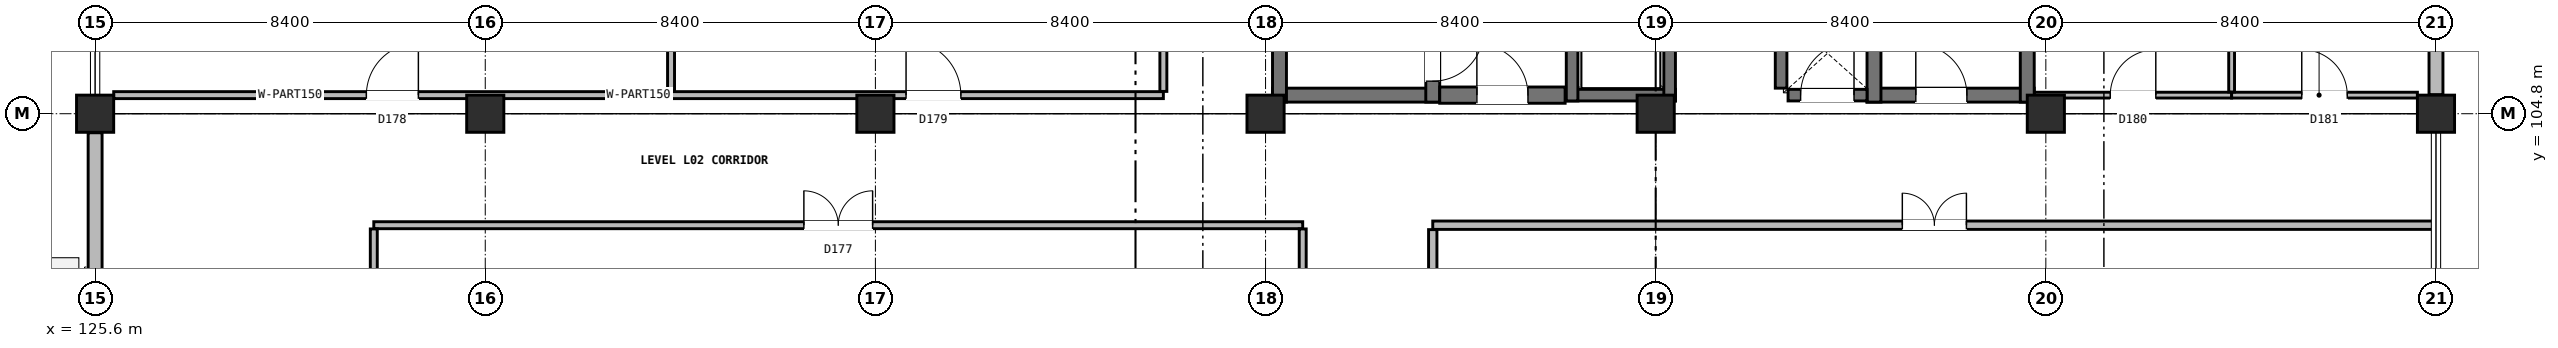
"""IFC4 building model, lengths in metres.
Left out: names, types, materials, properties, quantities, classifications, styles, units other than length and angle.
Written with IfcOpenShell. Run it as: python <this file> out.ifc"""

import sys

from ifc_helpers import new_model, si_unit, direction, frame, frame_2d, origin, origin_2d, place, context, subcontext, project, spatial, rectangle, extrude, element, fill, save


model = new_model("IFC4")
c1 = context("Model", 3, precision=1e-05, world=origin(), true_north=direction((0.0, 1.0)))
c2 = subcontext(c1, "Body", "Model", "MODEL_VIEW")
j1 = project(units=[si_unit("LENGTHUNIT", "METRE"), si_unit("PLANEANGLEUNIT", "RADIAN")], contexts=[c1])
p1 = place(None, origin())
s1 = spatial("IfcSite", under=j1, at=p1, CompositionType="ELEMENT")
p2 = place(p1, origin())
s2 = spatial("IfcBuilding", under=s1, at=p2, CompositionType="ELEMENT")
p3 = place(p2, frame((0.0, 0.0, 9.0)))
s3 = spatial("IfcBuildingStorey", under=s2, at=p3, CompositionType="ELEMENT", Elevation=9.0)
for number, where, z_axis, x_axis in (
    (1, (125.6, 104.8, 0.0), (0.0, 0.0, 1.0), (1.0, 0.0, 0.0)),
    (2, (134.0, 104.8, 0.0), (0.0, 0.0, 1.0), (1.0, 0.0, 0.0)),
    (3, (142.4, 104.8, 0.0), (0.0, 0.0, 1.0), (1.0, 0.0, 0.0)),
    (4, (150.8, 104.8, 0.0), (0.0, 0.0, 1.0), (1.0, 0.0, 0.0)),
    (5, (159.2, 104.8, 0.0), (0.0, 0.0, 1.0), (1.0, 0.0, 0.0)),
    (6, (167.6, 104.8, 0.0), (0.0, 0.0, 1.0), (1.0, 0.0, 0.0)),
    (7, (176.0, 104.8, 0.0), (0.0, 0.0, 1.0), (1.0, 0.0, 0.0)),
):
    element("IfcColumn", number, at=place(p3, frame(where, z_axis=z_axis, x_axis=x_axis)), inside=s3, PredefinedType="COLUMN", context=c2, shape_type="SweptSolid", body=[
        extrude(rectangle(XDim=0.8, YDim=0.8, at=origin_2d()), origin(), (0.0, 0.0, 1.0), 4.2),
    ])
p4 = place(p3, frame((176.0, 105.21, 0.0), z_axis=(0.0, 0.0, 1.0), x_axis=(0.0, 1.0, 0.0)))
e8 = element("IfcWall", 8, at=p4, inside=s3, PredefinedType="SOLIDWALL", context=c2, shape_type="SweptSolid", body=[
    extrude(rectangle(XDim=7.98, YDim=0.3, at=frame_2d((3.99, 0.0))), origin(), (0.0, 0.0, 1.0), 3.45),
])
p5 = place(p4, frame((3.15, 0.0, 0.9)))
e9 = element("IfcOpeningElement", 9, at=p5, cuts=e8, PredefinedType="OPENING", context=c2, shape_type="SweptSolid", body=[
    extrude(rectangle(XDim=1.68, YDim=2.28, at=frame_2d((0.84, 1.14))), frame((0.0, 0.16, 0.0), z_axis=(0.0, -1.0, 0.0), x_axis=(1.0, 0.0, 0.0)), (0.0, 0.0, 1.0), 0.32),
])
p6 = place(p3, frame((125.6, 104.39, 0.0), z_axis=(0.0, 0.0, 1.0), x_axis=(0.0, -1.0, 0.0)))
e10 = element("IfcWall", 10, at=p6, inside=s3, PredefinedType="SOLIDWALL", context=c2, shape_type="SweptSolid", body=[
    extrude(rectangle(XDim=7.98, YDim=0.3, at=frame_2d((3.99, 0.0))), origin(), (0.0, 0.0, 1.0), 3.45),
])
p7 = place(p6, frame((3.03, 0.0, 0.9)))
e11 = element("IfcOpeningElement", 11, at=p7, cuts=e10, PredefinedType="OPENING", context=c2, shape_type="SweptSolid", body=[
    extrude(rectangle(XDim=1.92, YDim=1.98, at=frame_2d((0.96, 0.99))), frame((0.0, 0.16, 0.0), z_axis=(0.0, -1.0, 0.0), x_axis=(1.0, 0.0, 0.0)), (0.0, 0.0, 1.0), 0.32),
])
p8 = place(p3, frame((150.95, 105.2, 0.0), z_axis=(0.0, 0.0, 1.0), x_axis=(1.0, 0.0, 0.0)))
e12 = element("IfcWall", 12, at=p8, inside=s3, PredefinedType="SHEAR", context=c2, shape_type="SweptSolid", body=[
    extrude(rectangle(XDim=3.6, YDim=0.3, at=frame_2d((1.8, 0.0))), origin(), (0.0, 0.0, 1.0), 4.2),
])
p9 = place(p3, frame((151.1, 105.05, 0.0), z_axis=(0.0, 0.0, 1.0), x_axis=(0.0, 1.0, 0.0)))
e13 = element("IfcWall", 13, at=p9, inside=s3, PredefinedType="SHEAR", context=c2, shape_type="SweptSolid", body=[
    extrude(rectangle(XDim=8.3, YDim=0.3, at=frame_2d((4.15, 0.0))), origin(), (0.0, 0.0, 1.0), 4.2),
])
p10 = place(p3, frame((154.4, 105.05, 0.0), z_axis=(0.0, 0.0, 1.0), x_axis=(0.0, 1.0, 0.0)))
e14 = element("IfcWall", 14, at=p10, inside=s3, PredefinedType="SHEAR", context=c2, shape_type="SweptSolid", body=[
    extrude(rectangle(XDim=8.3, YDim=0.3, at=frame_2d((4.15, 0.0))), origin(), (0.0, 0.0, 1.0), 4.2),
])
p11 = place(p10, frame((0.45, 0.0, 0.0)))
e15 = element("IfcOpeningElement", 15, at=p11, cuts=e14, PredefinedType="OPENING", context=c2, shape_type="SweptSolid", body=[
    extrude(rectangle(XDim=1.1, YDim=2.2, at=frame_2d((0.55, 1.1))), frame((0.0, 0.16, 0.0), z_axis=(0.0, -1.0, 0.0), x_axis=(1.0, 0.0, 0.0)), (0.0, 0.0, 1.0), 0.32),
])
p12 = place(p3, frame((163.75, 105.2, 0.0), z_axis=(0.0, 0.0, 1.0), x_axis=(1.0, 0.0, 0.0)))
e16 = element("IfcWall", 16, at=p12, inside=s3, PredefinedType="SHEAR", context=c2, shape_type="SweptSolid", body=[
    extrude(rectangle(XDim=3.6, YDim=0.3, at=frame_2d((1.8, 0.0))), origin(), (0.0, 0.0, 1.0), 4.2),
])
p13 = place(p12, frame((1.05, 0.0, 0.0)))
e17 = element("IfcOpeningElement", 17, at=p13, cuts=e16, PredefinedType="OPENING", context=c2, shape_type="SweptSolid", body=[
    extrude(rectangle(XDim=1.1, YDim=2.2, at=frame_2d((0.55, 1.1))), frame((0.0, 0.16, 0.0), z_axis=(0.0, -1.0, 0.0), x_axis=(1.0, 0.0, 0.0)), (0.0, 0.0, 1.0), 0.32),
])
for number, where, z_axis, x_axis in (
    (18, (163.9, 105.05, 0.0), (0.0, 0.0, 1.0), (0.0, 1.0, 0.0)),
    (19, (167.2, 105.05, 0.0), (0.0, 0.0, 1.0), (0.0, 1.0, 0.0)),
):
    element("IfcWall", number, at=place(p3, frame(where, z_axis=z_axis, x_axis=x_axis)), inside=s3, PredefinedType="SHEAR", context=c2, shape_type="SweptSolid", body=[
        extrude(rectangle(XDim=8.3, YDim=0.3, at=frame_2d((4.15, 0.0))), origin(), (0.0, 0.0, 1.0), 4.2),
    ])
p14 = place(p3, frame((157.275, 105.2, 0.0), z_axis=(0.0, 0.0, 1.0), x_axis=(1.0, 0.0, 0.0)))
e20 = element("IfcWall", 20, at=p14, inside=s3, PredefinedType="SOLIDWALL", context=c2, shape_type="SweptSolid", body=[
    extrude(rectangle(XDim=2.35, YDim=0.25, at=frame_2d((1.175, 0.0))), origin(), (0.0, 0.0, 1.0), 3.88),
])
for number, where, z_axis, x_axis in (
    (21, (157.4, 105.075, 0.0), (0.0, 0.0, 1.0), (0.0, 1.0, 0.0)),
    (22, (159.5, 105.075, 0.0), (0.0, 0.0, 1.0), (0.0, 1.0, 0.0)),
):
    element("IfcWall", number, at=place(p3, frame(where, z_axis=z_axis, x_axis=x_axis)), inside=s3, PredefinedType="SOLIDWALL", context=c2, shape_type="SweptSolid", body=[
        extrude(rectangle(XDim=2.65, YDim=0.25, at=frame_2d((1.325, 0.0))), origin(), (0.0, 0.0, 1.0), 3.88),
    ])
p15 = place(p3, frame((154.55, 105.2, 0.0), z_axis=(0.0, 0.0, 1.0), x_axis=(1.0, 0.0, 0.0)))
e23 = element("IfcWall", 23, at=p15, inside=s3, PredefinedType="SHEAR", context=c2, shape_type="SweptSolid", body=[
    extrude(rectangle(XDim=2.7, YDim=0.35, at=frame_2d((1.35, 0.0))), origin(), (0.0, 0.0, 1.0), 3.88),
])
p16 = place(p15, frame((0.8, 0.0, 0.0)))
e24 = element("IfcOpeningElement", 24, at=p16, cuts=e23, PredefinedType="OPENING", context=c2, shape_type="SweptSolid", body=[
    extrude(rectangle(XDim=1.1, YDim=2.2, at=frame_2d((0.55, 1.1))), frame((0.0, 0.185, 0.0), z_axis=(0.0, -1.0, 0.0), x_axis=(1.0, 0.0, 0.0)), (0.0, 0.0, 1.0), 0.37),
])
p17 = place(p3, frame((161.9, 105.35, 0.0), z_axis=(0.0, 0.0, 1.0), x_axis=(0.0, 1.0, 0.0)))
e25 = element("IfcWall", 25, at=p17, inside=s3, PredefinedType="SOLIDWALL", context=c2, shape_type="SweptSolid", body=[
    extrude(rectangle(XDim=1.5, YDim=0.25, at=frame_2d((0.75, 0.0))), origin(), (0.0, 0.0, 1.0), 3.88),
])
p18 = place(p3, frame((162.05, 105.2, 0.0), z_axis=(0.0, 0.0, 1.0), x_axis=(1.0, 0.0, 0.0)))
e26 = element("IfcWall", 26, at=p18, inside=s3, PredefinedType="SOLIDWALL", context=c2, shape_type="SweptSolid", body=[
    extrude(rectangle(XDim=1.7, YDim=0.25, at=frame_2d((0.85, 0.0))), origin(), (0.0, 0.0, 1.0), 3.88),
])
p19 = place(p18, frame((0.27, 0.0, 0.0)))
e27 = element("IfcOpeningElement", 27, at=p19, cuts=e26, PredefinedType="OPENING", context=c2, shape_type="SweptSolid", body=[
    extrude(rectangle(XDim=1.15, YDim=2.2, at=frame_2d((0.575, 1.1))), frame((0.0, 0.135, 0.0), z_axis=(0.0, -1.0, 0.0), x_axis=(1.0, 0.0, 0.0)), (0.0, 0.0, 1.0), 0.27),
])
p20 = place(p3, frame((154.4, 102.4, 0.0), z_axis=(0.0, 0.0, 1.0), x_axis=(1.0, 0.0, 0.0)))
e28 = element("IfcWall", 28, at=p20, inside=s3, PredefinedType="PARTITIONING", context=c2, shape_type="SweptSolid", body=[
    extrude(rectangle(XDim=21.6, YDim=0.18, at=frame_2d((10.8, 0.0))), origin(), (0.0, 0.0, 1.0), 3.865),
])
p21 = place(p20, frame((10.11, 0.0, 0.0)))
e29 = element("IfcOpeningElement", 29, at=p21, cuts=e28, PredefinedType="OPENING", context=c2, shape_type="SweptSolid", body=[
    extrude(rectangle(XDim=1.38, YDim=2.2, at=frame_2d((0.69, 1.1))), frame((0.0, 0.1, 0.0), z_axis=(0.0, -1.0, 0.0), x_axis=(1.0, 0.0, 0.0)), (0.0, 0.0, 1.0), 0.2),
])
p22 = place(p3, frame((131.6, 102.4, 0.0), z_axis=(0.0, 0.0, 1.0), x_axis=(1.0, 0.0, 0.0)))
e30 = element("IfcWall", 30, at=p22, inside=s3, PredefinedType="PARTITIONING", context=c2, shape_type="SweptSolid", body=[
    extrude(rectangle(XDim=20.0, YDim=0.15, at=frame_2d((10.0, 0.0))), origin(), (0.0, 0.0, 1.0), 3.865),
])
p23 = place(p22, frame((9.26, 0.0, 0.0)))
e31 = element("IfcOpeningElement", 31, at=p23, cuts=e30, PredefinedType="OPENING", context=c2, shape_type="SweptSolid", body=[
    extrude(rectangle(XDim=1.48, YDim=2.2, at=frame_2d((0.74, 1.1))), frame((0.0, 0.085, 0.0), z_axis=(0.0, -1.0, 0.0), x_axis=(1.0, 0.0, 0.0)), (0.0, 0.0, 1.0), 0.17),
])
p24 = place(p3, frame((126.0, 105.2, 0.0), z_axis=(0.0, 0.0, 1.0), x_axis=(1.0, 0.0, 0.0)))
e32 = element("IfcWall", 32, at=p24, inside=s3, PredefinedType="PARTITIONING", context=c2, shape_type="SweptSolid", body=[
    extrude(rectangle(XDim=12.0, YDim=0.15, at=frame_2d((6.0, 0.0))), origin(), (0.0, 0.0, 1.0), 3.245),
])
p25 = place(p24, frame((5.44, 0.0, 0.0)))
e33 = element("IfcOpeningElement", 33, at=p25, cuts=e32, PredefinedType="OPENING", context=c2, shape_type="SweptSolid", body=[
    extrude(rectangle(XDim=1.12, YDim=2.22, at=frame_2d((0.56, 1.11))), frame((0.0, 0.085, 0.0), z_axis=(0.0, -1.0, 0.0), x_axis=(1.0, 0.0, 0.0)), (0.0, 0.0, 1.0), 0.17),
])
p26 = place(p3, frame((138.0, 105.2, 0.0), z_axis=(0.0, 0.0, 1.0), x_axis=(1.0, 0.0, 0.0)))
e34 = element("IfcWall", 34, at=p26, inside=s3, PredefinedType="PARTITIONING", context=c2, shape_type="SweptSolid", body=[
    extrude(rectangle(XDim=10.6, YDim=0.15, at=frame_2d((5.3, 0.0))), origin(), (0.0, 0.0, 1.0), 3.245),
])
p27 = place(p26, frame((5.06, 0.0, 0.0)))
e35 = element("IfcOpeningElement", 35, at=p27, cuts=e34, PredefinedType="OPENING", context=c2, shape_type="SweptSolid", body=[
    extrude(rectangle(XDim=1.18, YDim=2.24, at=frame_2d((0.59, 1.12))), frame((0.0, 0.085, 0.0), z_axis=(0.0, -1.0, 0.0), x_axis=(1.0, 0.0, 0.0)), (0.0, 0.0, 1.0), 0.17),
])
p28 = place(p3, frame((167.355, 105.2, 0.0), z_axis=(0.0, 0.0, 1.0), x_axis=(1.0, 0.0, 0.0)))
e36 = element("IfcWall", 36, at=p28, inside=s3, PredefinedType="PARTITIONING", context=c2, shape_type="SweptSolid", body=[
    extrude(rectangle(XDim=4.245, YDim=0.125, at=frame_2d((2.123, 0.0))), origin(), (0.0, 0.0, 1.0), 3.245),
])
p29 = place(p28, frame((1.633, 0.0, 0.0)))
e37 = element("IfcOpeningElement", 37, at=p29, cuts=e36, PredefinedType="OPENING", context=c2, shape_type="SweptSolid", body=[
    extrude(rectangle(XDim=0.98, YDim=2.1, at=frame_2d((0.49, 1.05))), frame((0.0, 0.073, 0.0), z_axis=(0.0, -1.0, 0.0), x_axis=(1.0, 0.0, 0.0)), (0.0, 0.0, 1.0), 0.145),
])
p30 = place(p3, frame((171.6, 105.2, 0.0), z_axis=(0.0, 0.0, 1.0), x_axis=(1.0, 0.0, 0.0)))
e38 = element("IfcWall", 38, at=p30, inside=s3, PredefinedType="PARTITIONING", context=c2, shape_type="SweptSolid", body=[
    extrude(rectangle(XDim=4.0, YDim=0.125, at=frame_2d((2.0, 0.0))), origin(), (0.0, 0.0, 1.0), 3.245),
])
p31 = place(p30, frame((1.51, 0.0, 0.0)))
e39 = element("IfcOpeningElement", 39, at=p31, cuts=e38, PredefinedType="OPENING", context=c2, shape_type="SweptSolid", body=[
    extrude(rectangle(XDim=0.98, YDim=2.1, at=frame_2d((0.49, 1.05))), frame((0.0, 0.073, 0.0), z_axis=(0.0, -1.0, 0.0), x_axis=(1.0, 0.0, 0.0)), (0.0, 0.0, 1.0), 0.145),
])
p32 = place(p3, frame((131.6, 94.0, 0.0), z_axis=(0.0, 0.0, 1.0), x_axis=(0.0, 1.0, 0.0)))
e40 = element("IfcWall", 40, at=p32, inside=s3, PredefinedType="PARTITIONING", context=c2, shape_type="SweptSolid", body=[
    extrude(rectangle(XDim=8.32, YDim=0.15, at=frame_2d((4.16, 0.0))), origin(), (0.0, 0.0, 1.0), 3.865),
])
p33 = place(p3, frame((154.4, 84.0, 0.0), z_axis=(0.0, 0.0, 1.0), x_axis=(0.0, 1.0, 0.0)))
e41 = element("IfcWall", 41, at=p33, inside=s3, PredefinedType="PARTITIONING", context=c2, shape_type="SweptSolid", body=[
    extrude(rectangle(XDim=18.305, YDim=0.18, at=frame_2d((9.152, 0.0))), origin(), (0.0, 0.0, 1.0), 3.865),
])
p34 = place(p3, frame((151.6, 87.2, 0.0), z_axis=(0.0, 0.0, 1.0), x_axis=(0.0, 1.0, 0.0)))
e42 = element("IfcWall", 42, at=p34, inside=s3, PredefinedType="PARTITIONING", context=c2, shape_type="SweptSolid", body=[
    extrude(rectangle(XDim=15.12, YDim=0.15, at=frame_2d((7.56, 0.0))), origin(), (0.0, 0.0, 1.0), 3.865),
])
p35 = place(p3, frame((148.6, 105.28, 0.0), z_axis=(0.0, 0.0, 1.0), x_axis=(0.0, 1.0, 0.0)))
e43 = element("IfcWall", 43, at=p35, inside=s3, PredefinedType="PARTITIONING", context=c2, shape_type="SweptSolid", body=[
    extrude(rectangle(XDim=14.12, YDim=0.15, at=frame_2d((7.06, 0.0))), origin(), (0.0, 0.0, 1.0), 3.865),
])
p36 = place(p3, frame((138.0, 105.28, 0.0), z_axis=(0.0, 0.0, 1.0), x_axis=(0.0, 1.0, 0.0)))
e44 = element("IfcWall", 44, at=p36, inside=s3, PredefinedType="PARTITIONING", context=c2, shape_type="SweptSolid", body=[
    extrude(rectangle(XDim=16.965, YDim=0.15, at=frame_2d((8.482, 0.0))), origin(), (0.0, 0.0, 1.0), 3.865),
])
p37 = place(p3, frame((171.6, 105.268, 0.0), z_axis=(0.0, 0.0, 1.0), x_axis=(0.0, 1.0, 0.0)))
e45 = element("IfcWall", 45, at=p37, inside=s3, PredefinedType="PARTITIONING", context=c2, shape_type="SweptSolid", body=[
    extrude(rectangle(XDim=16.978, YDim=0.125, at=frame_2d((8.489, 0.0))), origin(), (0.0, 0.0, 1.0), 3.865),
])
p38 = place(p11, frame((1.1, 0.0, 0.0), z_axis=(0.0, 0.0, 1.0), x_axis=(-1.0, 0.0, 0.0)))
e46 = element("IfcDoor", 46, at=p38, inside=s3, OperationType="SINGLE_SWING_RIGHT", PredefinedType="DOOR", context=c2, shape_type="SweptSolid", body=[
    extrude(rectangle(XDim=1.1, YDim=2.2, at=frame_2d((0.55, 1.1))), frame((0.0, 0.025, 0.0), z_axis=(0.0, -1.0, 0.0), x_axis=(1.0, 0.0, 0.0)), (0.0, 0.0, 1.0), 0.05),
])
fill(e15, e46)
p39 = place(p13, origin())
e47 = element("IfcDoor", 47, at=p39, inside=s3, OperationType="SINGLE_SWING_LEFT", PredefinedType="DOOR", context=c2, shape_type="SweptSolid", body=[
    extrude(rectangle(XDim=1.1, YDim=2.2, at=frame_2d((0.55, 1.1))), frame((0.0, 0.025, 0.0), z_axis=(0.0, -1.0, 0.0), x_axis=(1.0, 0.0, 0.0)), (0.0, 0.0, 1.0), 0.05),
])
fill(e17, e47)
p40 = place(p16, origin())
e48 = element("IfcDoor", 48, at=p40, inside=s3, OperationType="SINGLE_SWING_LEFT", PredefinedType="DOOR", context=c2, shape_type="SweptSolid", body=[
    extrude(rectangle(XDim=1.1, YDim=2.2, at=frame_2d((0.55, 1.1))), frame((0.0, 0.025, 0.0), z_axis=(0.0, -1.0, 0.0), x_axis=(1.0, 0.0, 0.0)), (0.0, 0.0, 1.0), 0.05),
])
fill(e24, e48)
p41 = place(p19, origin())
e49 = element("IfcDoor", 49, at=p41, inside=s3, OperationType="SINGLE_SWING_RIGHT", PredefinedType="DOOR", context=c2, shape_type="SweptSolid", body=[
    extrude(rectangle(XDim=1.15, YDim=2.2, at=frame_2d((0.575, 1.1))), frame((0.0, 0.025, 0.0), z_axis=(0.0, -1.0, 0.0), x_axis=(1.0, 0.0, 0.0)), (0.0, 0.0, 1.0), 0.05),
])
fill(e27, e49)
p42 = place(p21, origin())
e50 = element("IfcDoor", 50, at=p42, inside=s3, OperationType="DOUBLE_DOOR_SINGLE_SWING", PredefinedType="DOOR", context=c2, shape_type="SweptSolid", body=[
    extrude(rectangle(XDim=1.38, YDim=2.2, at=frame_2d((0.69, 1.1))), frame((0.0, 0.025, 0.0), z_axis=(0.0, -1.0, 0.0), x_axis=(1.0, 0.0, 0.0)), (0.0, 0.0, 1.0), 0.05),
])
fill(e29, e50)
p43 = place(p23, origin())
e51 = element("IfcDoor", 51, at=p43, inside=s3, OperationType="DOUBLE_DOOR_SINGLE_SWING", PredefinedType="DOOR", context=c2, shape_type="SweptSolid", body=[
    extrude(rectangle(XDim=1.48, YDim=2.2, at=frame_2d((0.74, 1.1))), frame((0.0, 0.025, 0.0), z_axis=(0.0, -1.0, 0.0), x_axis=(1.0, 0.0, 0.0)), (0.0, 0.0, 1.0), 0.05),
])
fill(e31, e51)
p44 = place(p25, origin())
e52 = element("IfcDoor", 52, at=p44, inside=s3, OperationType="SINGLE_SWING_RIGHT", PredefinedType="DOOR", context=c2, shape_type="SweptSolid", body=[
    extrude(rectangle(XDim=1.12, YDim=2.22, at=frame_2d((0.56, 1.11))), frame((0.0, 0.025, 0.0), z_axis=(0.0, -1.0, 0.0), x_axis=(1.0, 0.0, 0.0)), (0.0, 0.0, 1.0), 0.05),
])
fill(e33, e52)
p45 = place(p27, origin())
e53 = element("IfcDoor", 53, at=p45, inside=s3, OperationType="SINGLE_SWING_LEFT", PredefinedType="DOOR", context=c2, shape_type="SweptSolid", body=[
    extrude(rectangle(XDim=1.18, YDim=2.24, at=frame_2d((0.59, 1.12))), frame((0.0, 0.025, 0.0), z_axis=(0.0, -1.0, 0.0), x_axis=(1.0, 0.0, 0.0)), (0.0, 0.0, 1.0), 0.05),
])
fill(e35, e53)
p46 = place(p29, origin())
e54 = element("IfcDoor", 54, at=p46, inside=s3, OperationType="SINGLE_SWING_RIGHT", PredefinedType="DOOR", context=c2, shape_type="SweptSolid", body=[
    extrude(rectangle(XDim=0.98, YDim=2.1, at=frame_2d((0.49, 1.05))), frame((0.0, 0.025, 0.0), z_axis=(0.0, -1.0, 0.0), x_axis=(1.0, 0.0, 0.0)), (0.0, 0.0, 1.0), 0.05),
])
fill(e37, e54)
p47 = place(p31, origin())
e55 = element("IfcDoor", 55, at=p47, inside=s3, OperationType="SINGLE_SWING_LEFT", PredefinedType="DOOR", context=c2, shape_type="SweptSolid", body=[
    extrude(rectangle(XDim=0.98, YDim=2.1, at=frame_2d((0.49, 1.05))), frame((0.0, 0.025, 0.0), z_axis=(0.0, -1.0, 0.0), x_axis=(1.0, 0.0, 0.0)), (0.0, 0.0, 1.0), 0.05),
])
fill(e39, e55)
save(model, sys.argv[1])
